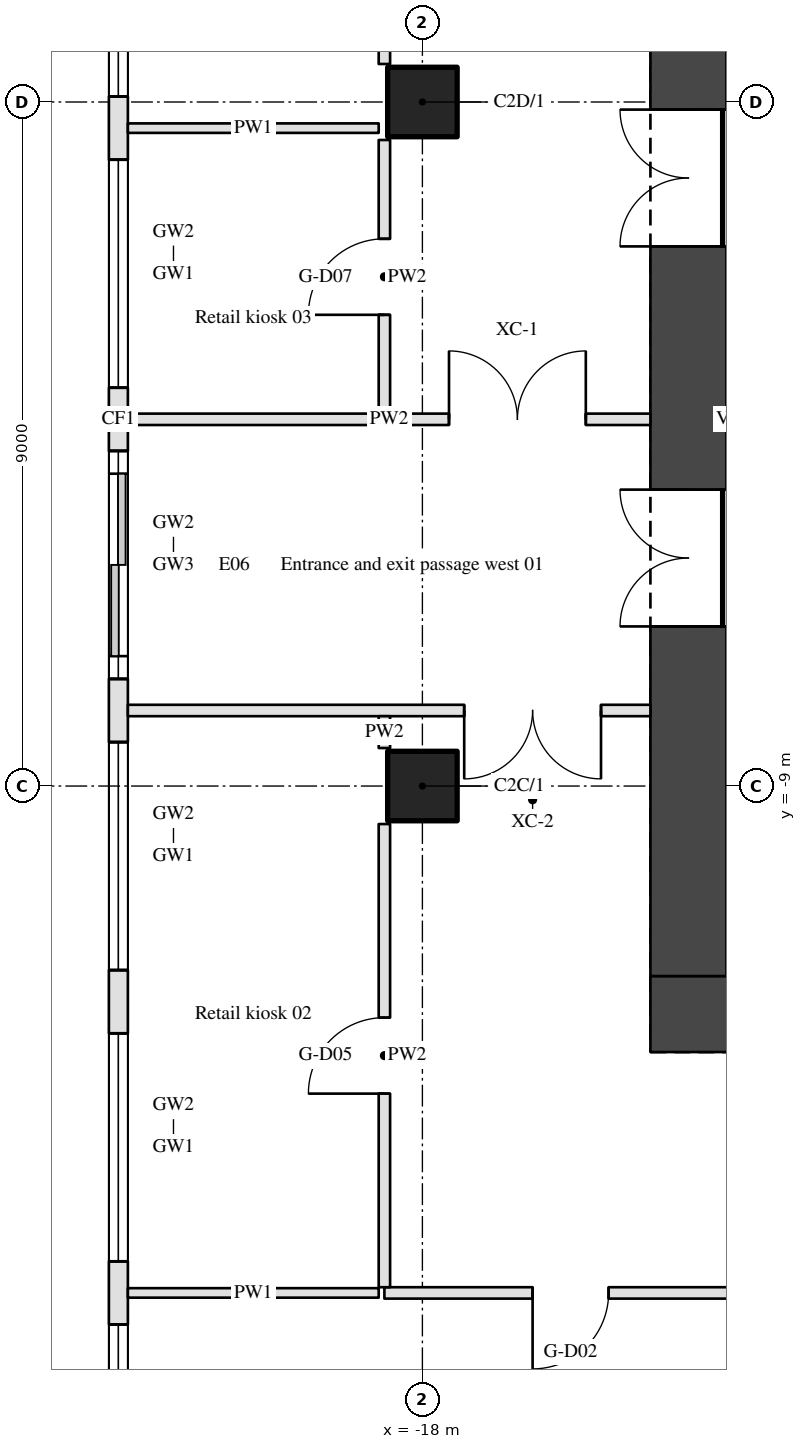
"""IFC4 building model, lengths in metres.
Left out: names, types, materials, properties, quantities, classifications, styles, units other than length and angle.
Written with IfcOpenShell. Run it as: python <this file> out.ifc"""

import sys

from ifc_helpers import new_model, si_unit, direction, frame, frame_2d, origin, origin_2d, place, context, subcontext, project, spatial, rectangle, hollow_circle, extrude, element, fill, save


model = new_model("IFC4")
c1 = context("Model", 3, precision=1e-05, world=origin(), true_north=direction((0.0, 1.0)))
c2 = subcontext(c1, "Body", "Model", "MODEL_VIEW")
j1 = project(units=[si_unit("LENGTHUNIT", "METRE"), si_unit("PLANEANGLEUNIT", "RADIAN")], contexts=[c1])
p1 = place(None, origin())
s1 = spatial("IfcSite", under=j1, at=p1, CompositionType="ELEMENT")
p2 = place(p1, origin())
s2 = spatial("IfcBuilding", under=s1, at=p2, CompositionType="ELEMENT")
p3 = place(p2, origin())
s3 = spatial("IfcBuildingStorey", under=s2, at=p3, CompositionType="ELEMENT", Elevation=0.0)
for number, where, z_axis, x_axis in (
    (1, (-18.0, -9.0, 0.0), (0.0, 0.0, 1.0), (1.0, 0.0, 0.0)),
    (2, (-18.0, 0.0, 0.0), (0.0, 0.0, 1.0), (1.0, 0.0, 0.0)),
):
    element("IfcColumn", number, at=place(p3, frame(where, z_axis=z_axis, x_axis=x_axis)), inside=s3, PredefinedType="COLUMN", context=c2, shape_type="SweptSolid", body=[
        extrude(hollow_circle(Radius=0.457, WallThickness=0.05, at=origin_2d()), origin(), (0.0, 0.0, 1.0), 10.8),
    ])
p4 = place(p3, frame((-15.0, -12.0, 0.0), z_axis=(0.0, 0.0, 1.0), x_axis=(1.0, 0.0, 0.0)))
e3 = element("IfcWall", 3, at=p4, inside=s3, PredefinedType="SHEAR", context=c2, shape_type="SweptSolid", body=[
    extrude(rectangle(XDim=30.0, YDim=1.0, at=frame_2d((15.0, 0.0))), origin(), (0.0, 0.0, 1.0), 10.8),
])
p5 = place(p3, frame((-14.5, -11.5, 0.0), z_axis=(0.0, 0.0, 1.0), x_axis=(0.0, 1.0, 0.0)))
e4 = element("IfcWall", 4, at=p5, inside=s3, PredefinedType="SHEAR", context=c2, shape_type="SweptSolid", body=[
    extrude(rectangle(XDim=14.65, YDim=1.0, at=frame_2d((7.325, 0.0))), origin(), (0.0, 0.0, 1.0), 10.8),
])
p6 = place(p5, frame((9.6, 0.0, 0.0)))
e5 = element("IfcOpeningElement", 5, at=p6, cuts=e4, PredefinedType="OPENING", context=c2, shape_type="SweptSolid", body=[
    extrude(rectangle(XDim=1.8, YDim=2.1, at=frame_2d((0.9, 1.05))), frame((0.0, 0.51, 0.0), z_axis=(0.0, -1.0, 0.0), x_axis=(1.0, 0.0, 0.0)), (0.0, 0.0, 1.0), 1.02),
])
p7 = place(p5, frame((4.6, 0.0, 0.0)))
e6 = element("IfcOpeningElement", 6, at=p7, cuts=e4, PredefinedType="OPENING", context=c2, shape_type="SweptSolid", body=[
    extrude(rectangle(XDim=1.8, YDim=2.1, at=frame_2d((0.9, 1.05))), frame((0.0, 0.51, 0.0), z_axis=(0.0, -1.0, 0.0), x_axis=(1.0, 0.0, 0.0)), (0.0, 0.0, 1.0), 1.02),
])
p8 = place(p3, frame((-22.0, 11.025, 0.0), z_axis=(0.0, 0.0, 1.0), x_axis=(0.0, -1.0, 0.0)))
e7 = element("IfcWall", 7, at=p8, inside=s3, PredefinedType="STANDARD", context=c2, shape_type="SweptSolid", body=[
    extrude(rectangle(XDim=30.4, YDim=0.25, at=frame_2d((15.2, 0.0))), origin(), (0.0, 0.0, 1.0), 10.0),
])
p9 = place(p8, frame((0.291, 0.0, 0.15)))
e8 = element("IfcOpeningElement", 8, at=p9, cuts=e7, PredefinedType="OPENING", context=c2, shape_type="SweptSolid", body=[
    extrude(rectangle(XDim=3.0, YDim=4.2, at=frame_2d((1.5, 2.1))), frame((0.0, 0.135, 0.0), z_axis=(0.0, -1.0, 0.0), x_axis=(1.0, 0.0, 0.0)), (0.0, 0.0, 1.0), 0.27),
])
p10 = place(p8, frame((0.291, 0.0, 4.95)))
e9 = element("IfcOpeningElement", 9, at=p10, cuts=e7, PredefinedType="OPENING", context=c2, shape_type="SweptSolid", body=[
    extrude(rectangle(XDim=3.0, YDim=4.4, at=frame_2d((1.5, 2.2))), frame((0.0, 0.135, 0.0), z_axis=(0.0, -1.0, 0.0), x_axis=(1.0, 0.0, 0.0)), (0.0, 0.0, 1.0), 0.27),
])
p11 = place(p8, frame((4.122, 0.0, 0.15)))
e10 = element("IfcOpeningElement", 10, at=p11, cuts=e7, PredefinedType="OPENING", context=c2, shape_type="SweptSolid", body=[
    extrude(rectangle(XDim=3.0, YDim=4.2, at=frame_2d((1.5, 2.1))), frame((0.0, 0.135, 0.0), z_axis=(0.0, -1.0, 0.0), x_axis=(1.0, 0.0, 0.0)), (0.0, 0.0, 1.0), 0.27),
])
p12 = place(p8, frame((4.122, 0.0, 4.95)))
e11 = element("IfcOpeningElement", 11, at=p12, cuts=e7, PredefinedType="OPENING", context=c2, shape_type="SweptSolid", body=[
    extrude(rectangle(XDim=3.0, YDim=4.4, at=frame_2d((1.5, 2.2))), frame((0.0, 0.135, 0.0), z_axis=(0.0, -1.0, 0.0), x_axis=(1.0, 0.0, 0.0)), (0.0, 0.0, 1.0), 0.27),
])
p13 = place(p8, frame((7.953, 0.0, 0.15)))
e12 = element("IfcOpeningElement", 12, at=p13, cuts=e7, PredefinedType="OPENING", context=c2, shape_type="SweptSolid", body=[
    extrude(rectangle(XDim=3.0, YDim=4.2, at=frame_2d((1.5, 2.1))), frame((0.0, 0.135, 0.0), z_axis=(0.0, -1.0, 0.0), x_axis=(1.0, 0.0, 0.0)), (0.0, 0.0, 1.0), 0.27),
])
p14 = place(p8, frame((7.953, 0.0, 4.95)))
e13 = element("IfcOpeningElement", 13, at=p14, cuts=e7, PredefinedType="OPENING", context=c2, shape_type="SweptSolid", body=[
    extrude(rectangle(XDim=3.0, YDim=4.4, at=frame_2d((1.5, 2.2))), frame((0.0, 0.135, 0.0), z_axis=(0.0, -1.0, 0.0), x_axis=(1.0, 0.0, 0.0)), (0.0, 0.0, 1.0), 0.27),
])
p15 = place(p8, frame((11.784, 0.0, 0.15)))
e14 = element("IfcOpeningElement", 14, at=p15, cuts=e7, PredefinedType="OPENING", context=c2, shape_type="SweptSolid", body=[
    extrude(rectangle(XDim=3.0, YDim=4.2, at=frame_2d((1.5, 2.1))), frame((0.0, 0.135, 0.0), z_axis=(0.0, -1.0, 0.0), x_axis=(1.0, 0.0, 0.0)), (0.0, 0.0, 1.0), 0.27),
])
p16 = place(p8, frame((11.784, 0.0, 4.95)))
e15 = element("IfcOpeningElement", 15, at=p16, cuts=e7, PredefinedType="OPENING", context=c2, shape_type="SweptSolid", body=[
    extrude(rectangle(XDim=3.0, YDim=4.4, at=frame_2d((1.5, 2.2))), frame((0.0, 0.135, 0.0), z_axis=(0.0, -1.0, 0.0), x_axis=(1.0, 0.0, 0.0)), (0.0, 0.0, 1.0), 0.27),
])
p17 = place(p8, frame((15.916, 0.0, 0.0)))
e16 = element("IfcOpeningElement", 16, at=p17, cuts=e7, PredefinedType="OPENING", context=c2, shape_type="SweptSolid", body=[
    extrude(rectangle(XDim=2.4, YDim=2.6, at=frame_2d((1.2, 1.3))), frame((0.0, 0.135, 0.0), z_axis=(0.0, -1.0, 0.0), x_axis=(1.0, 0.0, 0.0)), (0.0, 0.0, 1.0), 0.27),
])
p18 = place(p8, frame((15.616, 0.0, 2.9)))
e17 = element("IfcOpeningElement", 17, at=p18, cuts=e7, PredefinedType="OPENING", context=c2, shape_type="SweptSolid", body=[
    extrude(rectangle(XDim=3.0, YDim=1.45, at=frame_2d((1.5, 0.725))), frame((0.0, 0.135, 0.0), z_axis=(0.0, -1.0, 0.0), x_axis=(1.0, 0.0, 0.0)), (0.0, 0.0, 1.0), 0.27),
])
p19 = place(p8, frame((15.616, 0.0, 4.95)))
e18 = element("IfcOpeningElement", 18, at=p19, cuts=e7, PredefinedType="OPENING", context=c2, shape_type="SweptSolid", body=[
    extrude(rectangle(XDim=3.0, YDim=4.4, at=frame_2d((1.5, 2.2))), frame((0.0, 0.135, 0.0), z_axis=(0.0, -1.0, 0.0), x_axis=(1.0, 0.0, 0.0)), (0.0, 0.0, 1.0), 0.27),
])
p20 = place(p8, frame((19.447, 0.0, 0.15)))
e19 = element("IfcOpeningElement", 19, at=p20, cuts=e7, PredefinedType="OPENING", context=c2, shape_type="SweptSolid", body=[
    extrude(rectangle(XDim=3.0, YDim=4.2, at=frame_2d((1.5, 2.1))), frame((0.0, 0.135, 0.0), z_axis=(0.0, -1.0, 0.0), x_axis=(1.0, 0.0, 0.0)), (0.0, 0.0, 1.0), 0.27),
])
p21 = place(p8, frame((19.447, 0.0, 4.95)))
e20 = element("IfcOpeningElement", 20, at=p21, cuts=e7, PredefinedType="OPENING", context=c2, shape_type="SweptSolid", body=[
    extrude(rectangle(XDim=3.0, YDim=4.4, at=frame_2d((1.5, 2.2))), frame((0.0, 0.135, 0.0), z_axis=(0.0, -1.0, 0.0), x_axis=(1.0, 0.0, 0.0)), (0.0, 0.0, 1.0), 0.27),
])
p22 = place(p8, frame((23.278, 0.0, 0.15)))
e21 = element("IfcOpeningElement", 21, at=p22, cuts=e7, PredefinedType="OPENING", context=c2, shape_type="SweptSolid", body=[
    extrude(rectangle(XDim=3.0, YDim=4.2, at=frame_2d((1.5, 2.1))), frame((0.0, 0.135, 0.0), z_axis=(0.0, -1.0, 0.0), x_axis=(1.0, 0.0, 0.0)), (0.0, 0.0, 1.0), 0.27),
])
p23 = place(p8, frame((23.278, 0.0, 4.95)))
e22 = element("IfcOpeningElement", 22, at=p23, cuts=e7, PredefinedType="OPENING", context=c2, shape_type="SweptSolid", body=[
    extrude(rectangle(XDim=3.0, YDim=4.4, at=frame_2d((1.5, 2.2))), frame((0.0, 0.135, 0.0), z_axis=(0.0, -1.0, 0.0), x_axis=(1.0, 0.0, 0.0)), (0.0, 0.0, 1.0), 0.27),
])
p24 = place(p8, frame((27.109, 0.0, 0.15)))
e23 = element("IfcOpeningElement", 23, at=p24, cuts=e7, PredefinedType="OPENING", context=c2, shape_type="SweptSolid", body=[
    extrude(rectangle(XDim=3.0, YDim=4.2, at=frame_2d((1.5, 2.1))), frame((0.0, 0.135, 0.0), z_axis=(0.0, -1.0, 0.0), x_axis=(1.0, 0.0, 0.0)), (0.0, 0.0, 1.0), 0.27),
])
p25 = place(p8, frame((27.109, 0.0, 4.95)))
e24 = element("IfcOpeningElement", 24, at=p25, cuts=e7, PredefinedType="OPENING", context=c2, shape_type="SweptSolid", body=[
    extrude(rectangle(XDim=3.0, YDim=4.4, at=frame_2d((1.5, 2.2))), frame((0.0, 0.135, 0.0), z_axis=(0.0, -1.0, 0.0), x_axis=(1.0, 0.0, 0.0)), (0.0, 0.0, 1.0), 0.27),
])
p26 = place(p3, frame((-21.875, -15.669, 0.0), z_axis=(0.0, 0.0, 1.0), x_axis=(1.0, 0.0, 0.0)))
e25 = element("IfcWall", 25, at=p26, inside=s3, PredefinedType="PARTITIONING", context=c2, shape_type="SweptSolid", body=[
    extrude(rectangle(XDim=3.3, YDim=0.125, at=frame_2d((1.65, 0.0))), origin(), (0.0, 0.0, 1.0), 9.86),
])
p27 = place(p3, frame((-13.6, -15.669, 0.0), z_axis=(0.0, 0.0, 1.0), x_axis=(-1.0, 0.0, 0.0)))
e26 = element("IfcWall", 26, at=p27, inside=s3, PredefinedType="PARTITIONING", context=c2, shape_type="SweptSolid", body=[
    extrude(rectangle(XDim=4.9, YDim=0.15, at=frame_2d((2.45, 0.0))), origin(), (0.0, 0.0, 1.0), 9.86),
])
p28 = place(p27, frame((1.95, 0.0, 0.0)))
e27 = element("IfcOpeningElement", 27, at=p28, cuts=e26, PredefinedType="OPENING", context=c2, shape_type="SweptSolid", body=[
    extrude(rectangle(XDim=1.0, YDim=2.1, at=frame_2d((0.5, 1.05))), frame((0.0, 0.085, 0.0), z_axis=(0.0, -1.0, 0.0), x_axis=(1.0, 0.0, 0.0)), (0.0, 0.0, 1.0), 0.17),
])
p29 = place(p3, frame((-15.0, -8.006, 0.0), z_axis=(0.0, 0.0, 1.0), x_axis=(-1.0, 0.0, 0.0)))
e28 = element("IfcWall", 28, at=p29, inside=s3, PredefinedType="PARTITIONING", context=c2, shape_type="SweptSolid", body=[
    extrude(rectangle(XDim=6.875, YDim=0.15, at=frame_2d((3.438, 0.0))), origin(), (0.0, 0.0, 1.0), 9.86),
])
p30 = place(p29, frame((0.65, 0.0, 0.0)))
e29 = element("IfcOpeningElement", 29, at=p30, cuts=e28, PredefinedType="OPENING", context=c2, shape_type="SweptSolid", body=[
    extrude(rectangle(XDim=1.8, YDim=2.1, at=frame_2d((0.9, 1.05))), frame((0.0, 0.085, 0.0), z_axis=(0.0, -1.0, 0.0), x_axis=(1.0, 0.0, 0.0)), (0.0, 0.0, 1.0), 0.17),
])
p31 = place(p3, frame((-21.875, -4.175, 0.0), z_axis=(0.0, 0.0, 1.0), x_axis=(1.0, 0.0, 0.0)))
e30 = element("IfcWall", 30, at=p31, inside=s3, PredefinedType="PARTITIONING", context=c2, shape_type="SweptSolid", body=[
    extrude(rectangle(XDim=6.875, YDim=0.15, at=frame_2d((3.438, 0.0))), origin(), (0.0, 0.0, 1.0), 9.86),
])
p32 = place(p31, frame((4.225, 0.0, 0.0)))
e31 = element("IfcOpeningElement", 31, at=p32, cuts=e30, PredefinedType="OPENING", context=c2, shape_type="SweptSolid", body=[
    extrude(rectangle(XDim=1.8, YDim=2.1, at=frame_2d((0.9, 1.05))), frame((0.0, 0.085, 0.0), z_axis=(0.0, -1.0, 0.0), x_axis=(1.0, 0.0, 0.0)), (0.0, 0.0, 1.0), 0.17),
])
p33 = place(p3, frame((-21.875, -0.344, 0.0), z_axis=(0.0, 0.0, 1.0), x_axis=(1.0, 0.0, 0.0)))
e32 = element("IfcWall", 32, at=p33, inside=s3, PredefinedType="PARTITIONING", context=c2, shape_type="SweptSolid", body=[
    extrude(rectangle(XDim=3.3, YDim=0.125, at=frame_2d((1.65, 0.0))), origin(), (0.0, 0.0, 1.0), 9.86),
])
p34 = place(p3, frame((-18.5, -15.594, 0.0), z_axis=(0.0, 0.0, 1.0), x_axis=(0.0, 1.0, 0.0)))
e33 = element("IfcWall", 33, at=p34, inside=s3, PredefinedType="PARTITIONING", context=c2, shape_type="SweptSolid", body=[
    extrude(rectangle(XDim=6.094, YDim=0.15, at=frame_2d((3.047, 0.0))), origin(), (0.0, 0.0, 1.0), 9.86),
])
p35 = place(p34, frame((2.547, 0.0, 0.0)))
e34 = element("IfcOpeningElement", 34, at=p35, cuts=e33, PredefinedType="OPENING", context=c2, shape_type="SweptSolid", body=[
    extrude(rectangle(XDim=1.0, YDim=2.1, at=frame_2d((0.5, 1.05))), frame((0.0, 0.085, 0.0), z_axis=(0.0, -1.0, 0.0), x_axis=(1.0, 0.0, 0.0)), (0.0, 0.0, 1.0), 0.17),
])
p36 = place(p3, frame((-18.5, -8.5, 0.0), z_axis=(0.0, 0.0, 1.0), x_axis=(0.0, 1.0, 0.0)))
e35 = element("IfcWall", 35, at=p36, inside=s3, PredefinedType="PARTITIONING", context=c2, shape_type="SweptSolid", body=[
    extrude(rectangle(XDim=0.419, YDim=0.15, at=frame_2d((0.209, 0.0))), origin(), (0.0, 0.0, 1.0), 9.86),
])
p37 = place(p3, frame((-18.5, -4.1, 0.0), z_axis=(0.0, 0.0, 1.0), x_axis=(0.0, 1.0, 0.0)))
e36 = element("IfcWall", 36, at=p37, inside=s3, PredefinedType="PARTITIONING", context=c2, shape_type="SweptSolid", body=[
    extrude(rectangle(XDim=3.6, YDim=0.15, at=frame_2d((1.8, 0.0))), origin(), (0.0, 0.0, 1.0), 9.86),
])
p38 = place(p37, frame((1.3, 0.0, 0.0)))
e37 = element("IfcOpeningElement", 37, at=p38, cuts=e36, PredefinedType="OPENING", context=c2, shape_type="SweptSolid", body=[
    extrude(rectangle(XDim=1.0, YDim=2.1, at=frame_2d((0.5, 1.05))), frame((0.0, 0.085, 0.0), z_axis=(0.0, -1.0, 0.0), x_axis=(1.0, 0.0, 0.0)), (0.0, 0.0, 1.0), 0.17),
])
p39 = place(p3, frame((-18.5, 0.5, 0.0), z_axis=(0.0, 0.0, 1.0), x_axis=(0.0, 1.0, 0.0)))
e38 = element("IfcWall", 38, at=p39, inside=s3, PredefinedType="PARTITIONING", context=c2, shape_type="SweptSolid", body=[
    extrude(rectangle(XDim=6.744, YDim=0.15, at=frame_2d((3.372, 0.0))), origin(), (0.0, 0.0, 1.0), 9.86),
])
p40 = place(p39, frame((2.872, 0.0, 0.0)))
e39 = element("IfcOpeningElement", 39, at=p40, cuts=e38, PredefinedType="OPENING", context=c2, shape_type="SweptSolid", body=[
    extrude(rectangle(XDim=1.0, YDim=2.1, at=frame_2d((0.5, 1.05))), frame((0.0, 0.085, 0.0), z_axis=(0.0, -1.0, 0.0), x_axis=(1.0, 0.0, 0.0)), (0.0, 0.0, 1.0), 0.17),
])
p41 = place(p13, origin())
e40 = element("IfcWindow", 40, at=p41, inside=s3, PartitioningType="DOUBLE_PANEL_HORIZONTAL", PredefinedType="WINDOW", context=c2, shape_type="SweptSolid", body=[
    extrude(rectangle(XDim=3.0, YDim=4.2, at=frame_2d((1.5, 2.1))), frame((0.0, 0.03, 0.0), z_axis=(0.0, -1.0, 0.0), x_axis=(1.0, 0.0, 0.0)), (0.0, 0.0, 1.0), 0.06),
])
fill(e12, e40)
p42 = place(p14, origin())
e41 = element("IfcWindow", 41, at=p42, inside=s3, PartitioningType="DOUBLE_PANEL_HORIZONTAL", PredefinedType="WINDOW", context=c2, shape_type="SweptSolid", body=[
    extrude(rectangle(XDim=3.0, YDim=4.4, at=frame_2d((1.5, 2.2))), frame((0.0, 0.03, 0.0), z_axis=(0.0, -1.0, 0.0), x_axis=(1.0, 0.0, 0.0)), (0.0, 0.0, 1.0), 0.06),
])
fill(e13, e41)
p43 = place(p15, origin())
e42 = element("IfcWindow", 42, at=p43, inside=s3, PartitioningType="DOUBLE_PANEL_HORIZONTAL", PredefinedType="WINDOW", context=c2, shape_type="SweptSolid", body=[
    extrude(rectangle(XDim=3.0, YDim=4.2, at=frame_2d((1.5, 2.1))), frame((0.0, 0.03, 0.0), z_axis=(0.0, -1.0, 0.0), x_axis=(1.0, 0.0, 0.0)), (0.0, 0.0, 1.0), 0.06),
])
fill(e14, e42)
p44 = place(p16, origin())
e43 = element("IfcWindow", 43, at=p44, inside=s3, PartitioningType="DOUBLE_PANEL_HORIZONTAL", PredefinedType="WINDOW", context=c2, shape_type="SweptSolid", body=[
    extrude(rectangle(XDim=3.0, YDim=4.4, at=frame_2d((1.5, 2.2))), frame((0.0, 0.03, 0.0), z_axis=(0.0, -1.0, 0.0), x_axis=(1.0, 0.0, 0.0)), (0.0, 0.0, 1.0), 0.06),
])
fill(e15, e43)
p45 = place(p17, origin())
e44 = element("IfcDoor", 44, at=p45, inside=s3, OperationType="DOUBLE_DOOR_SLIDING", PredefinedType="DOOR", context=c2, shape_type="SweptSolid", body=[
    extrude(rectangle(XDim=2.4, YDim=2.6, at=frame_2d((1.2, 1.3))), frame((0.0, 0.025, 0.0), z_axis=(0.0, -1.0, 0.0), x_axis=(1.0, 0.0, 0.0)), (0.0, 0.0, 1.0), 0.05),
])
fill(e16, e44)
p46 = place(p18, origin())
e45 = element("IfcWindow", 45, at=p46, inside=s3, PartitioningType="SINGLE_PANEL", PredefinedType="WINDOW", context=c2, shape_type="SweptSolid", body=[
    extrude(rectangle(XDim=3.0, YDim=1.45, at=frame_2d((1.5, 0.725))), frame((0.0, 0.03, 0.0), z_axis=(0.0, -1.0, 0.0), x_axis=(1.0, 0.0, 0.0)), (0.0, 0.0, 1.0), 0.06),
])
fill(e17, e45)
p47 = place(p19, origin())
e46 = element("IfcWindow", 46, at=p47, inside=s3, PartitioningType="DOUBLE_PANEL_HORIZONTAL", PredefinedType="WINDOW", context=c2, shape_type="SweptSolid", body=[
    extrude(rectangle(XDim=3.0, YDim=4.4, at=frame_2d((1.5, 2.2))), frame((0.0, 0.03, 0.0), z_axis=(0.0, -1.0, 0.0), x_axis=(1.0, 0.0, 0.0)), (0.0, 0.0, 1.0), 0.06),
])
fill(e18, e46)
p48 = place(p20, origin())
e47 = element("IfcWindow", 47, at=p48, inside=s3, PartitioningType="DOUBLE_PANEL_HORIZONTAL", PredefinedType="WINDOW", context=c2, shape_type="SweptSolid", body=[
    extrude(rectangle(XDim=3.0, YDim=4.2, at=frame_2d((1.5, 2.1))), frame((0.0, 0.03, 0.0), z_axis=(0.0, -1.0, 0.0), x_axis=(1.0, 0.0, 0.0)), (0.0, 0.0, 1.0), 0.06),
])
fill(e19, e47)
p49 = place(p21, origin())
e48 = element("IfcWindow", 48, at=p49, inside=s3, PartitioningType="DOUBLE_PANEL_HORIZONTAL", PredefinedType="WINDOW", context=c2, shape_type="SweptSolid", body=[
    extrude(rectangle(XDim=3.0, YDim=4.4, at=frame_2d((1.5, 2.2))), frame((0.0, 0.03, 0.0), z_axis=(0.0, -1.0, 0.0), x_axis=(1.0, 0.0, 0.0)), (0.0, 0.0, 1.0), 0.06),
])
fill(e20, e48)
p50 = place(p22, origin())
e49 = element("IfcWindow", 49, at=p50, inside=s3, PartitioningType="DOUBLE_PANEL_HORIZONTAL", PredefinedType="WINDOW", context=c2, shape_type="SweptSolid", body=[
    extrude(rectangle(XDim=3.0, YDim=4.2, at=frame_2d((1.5, 2.1))), frame((0.0, 0.03, 0.0), z_axis=(0.0, -1.0, 0.0), x_axis=(1.0, 0.0, 0.0)), (0.0, 0.0, 1.0), 0.06),
])
fill(e21, e49)
p51 = place(p23, origin())
e50 = element("IfcWindow", 50, at=p51, inside=s3, PartitioningType="DOUBLE_PANEL_HORIZONTAL", PredefinedType="WINDOW", context=c2, shape_type="SweptSolid", body=[
    extrude(rectangle(XDim=3.0, YDim=4.4, at=frame_2d((1.5, 2.2))), frame((0.0, 0.03, 0.0), z_axis=(0.0, -1.0, 0.0), x_axis=(1.0, 0.0, 0.0)), (0.0, 0.0, 1.0), 0.06),
])
fill(e22, e50)
p52 = place(p24, origin())
e51 = element("IfcWindow", 51, at=p52, inside=s3, PartitioningType="DOUBLE_PANEL_HORIZONTAL", PredefinedType="WINDOW", context=c2, shape_type="SweptSolid", body=[
    extrude(rectangle(XDim=3.0, YDim=4.2, at=frame_2d((1.5, 2.1))), frame((0.0, 0.03, 0.0), z_axis=(0.0, -1.0, 0.0), x_axis=(1.0, 0.0, 0.0)), (0.0, 0.0, 1.0), 0.06),
])
fill(e23, e51)
p53 = place(p25, origin())
e52 = element("IfcWindow", 52, at=p53, inside=s3, PartitioningType="DOUBLE_PANEL_HORIZONTAL", PredefinedType="WINDOW", context=c2, shape_type="SweptSolid", body=[
    extrude(rectangle(XDim=3.0, YDim=4.4, at=frame_2d((1.5, 2.2))), frame((0.0, 0.03, 0.0), z_axis=(0.0, -1.0, 0.0), x_axis=(1.0, 0.0, 0.0)), (0.0, 0.0, 1.0), 0.06),
])
fill(e24, e52)
p54 = place(p6, origin())
e53 = element("IfcDoor", 53, at=p54, inside=s3, OperationType="DOUBLE_DOOR_SINGLE_SWING", PredefinedType="DOOR", context=c2, shape_type="SweptSolid", body=[
    extrude(rectangle(XDim=1.8, YDim=2.1, at=frame_2d((0.9, 1.05))), frame((0.0, 0.025, 0.0), z_axis=(0.0, -1.0, 0.0), x_axis=(1.0, 0.0, 0.0)), (0.0, 0.0, 1.0), 0.05),
])
fill(e5, e53)
p55 = place(p32, origin())
e54 = element("IfcDoor", 54, at=p55, inside=s3, OperationType="DOUBLE_DOOR_SINGLE_SWING", PredefinedType="DOOR", context=c2, shape_type="SweptSolid", body=[
    extrude(rectangle(XDim=1.8, YDim=2.1, at=frame_2d((0.9, 1.05))), frame((0.0, 0.025, 0.0), z_axis=(0.0, -1.0, 0.0), x_axis=(1.0, 0.0, 0.0)), (0.0, 0.0, 1.0), 0.05),
])
fill(e31, e54)
p56 = place(p30, origin())
e55 = element("IfcDoor", 55, at=p56, inside=s3, OperationType="DOUBLE_DOOR_SINGLE_SWING", PredefinedType="DOOR", context=c2, shape_type="SweptSolid", body=[
    extrude(rectangle(XDim=1.8, YDim=2.1, at=frame_2d((0.9, 1.05))), frame((0.0, 0.025, 0.0), z_axis=(0.0, -1.0, 0.0), x_axis=(1.0, 0.0, 0.0)), (0.0, 0.0, 1.0), 0.05),
])
fill(e29, e55)
p57 = place(p7, origin())
e56 = element("IfcDoor", 56, at=p57, inside=s3, OperationType="DOUBLE_DOOR_SINGLE_SWING", PredefinedType="DOOR", context=c2, shape_type="SweptSolid", body=[
    extrude(rectangle(XDim=1.8, YDim=2.1, at=frame_2d((0.9, 1.05))), frame((0.0, 0.025, 0.0), z_axis=(0.0, -1.0, 0.0), x_axis=(1.0, 0.0, 0.0)), (0.0, 0.0, 1.0), 0.05),
])
fill(e6, e56)
p58 = place(p38, origin())
e57 = element("IfcDoor", 57, at=p58, inside=s3, OperationType="SINGLE_SWING_LEFT", PredefinedType="DOOR", context=c2, shape_type="SweptSolid", body=[
    extrude(rectangle(XDim=1.0, YDim=2.1, at=frame_2d((0.5, 1.05))), frame((0.0, 0.025, 0.0), z_axis=(0.0, -1.0, 0.0), x_axis=(1.0, 0.0, 0.0)), (0.0, 0.0, 1.0), 0.05),
])
fill(e37, e57)
p59 = place(p35, origin())
e58 = element("IfcDoor", 58, at=p59, inside=s3, OperationType="SINGLE_SWING_LEFT", PredefinedType="DOOR", context=c2, shape_type="SweptSolid", body=[
    extrude(rectangle(XDim=1.0, YDim=2.1, at=frame_2d((0.5, 1.05))), frame((0.0, 0.025, 0.0), z_axis=(0.0, -1.0, 0.0), x_axis=(1.0, 0.0, 0.0)), (0.0, 0.0, 1.0), 0.05),
])
fill(e34, e58)
p60 = place(p28, origin())
e59 = element("IfcDoor", 59, at=p60, inside=s3, OperationType="SINGLE_SWING_RIGHT", PredefinedType="DOOR", context=c2, shape_type="SweptSolid", body=[
    extrude(rectangle(XDim=1.0, YDim=2.1, at=frame_2d((0.5, 1.05))), frame((0.0, 0.025, 0.0), z_axis=(0.0, -1.0, 0.0), x_axis=(1.0, 0.0, 0.0)), (0.0, 0.0, 1.0), 0.05),
])
fill(e27, e59)
save(model, sys.argv[1])
